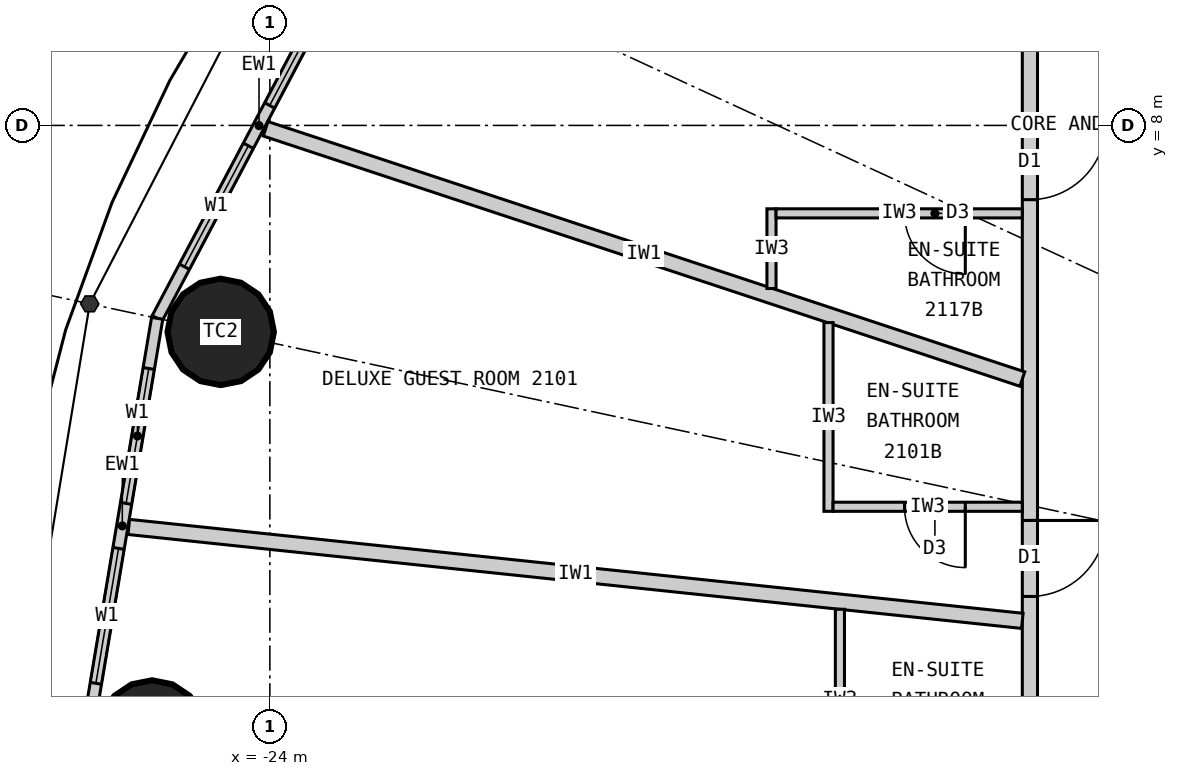
"""IFC4 building model, lengths in metres.
Left out: names, types, materials, properties, quantities, classifications, styles, units other than length and angle.
Written with IfcOpenShell. Run it as: python <this file> out.ifc"""

import sys

from ifc_helpers import new_model, si_unit, direction, frame, frame_2d, origin, origin_2d, place, context, subcontext, project, spatial, rectangle, circle, extrude, element, fill, save


model = new_model("IFC4")
c1 = context("Model", 3, precision=1e-05, world=origin(), true_north=direction((0.0, 1.0)))
c2 = subcontext(c1, "Body", "Model", "MODEL_VIEW")
j1 = project(units=[si_unit("LENGTHUNIT", "METRE"), si_unit("PLANEANGLEUNIT", "RADIAN")], contexts=[c1])
p1 = place(None, origin())
s1 = spatial("IfcSite", under=j1, at=p1, CompositionType="ELEMENT")
p2 = place(p1, origin())
s2 = spatial("IfcBuilding", under=s1, at=p2, CompositionType="ELEMENT")
p3 = place(p2, frame((0.0, 0.0, 83.7)))
s3 = spatial("IfcBuildingStorey", under=s2, at=p3, CompositionType="ELEMENT", Elevation=83.7)
for number, where, z_axis, x_axis in (
    (1, (-24.647, 5.283, 0.0), (0.0, 0.0, 1.0), (1.0, 0.0, 0.0)),
    (2, (-25.55, 0.0, 0.0), (0.0, 0.0, 1.0), (1.0, 0.0, 0.0)),
):
    element("IfcColumn", number, at=place(p3, frame(where, z_axis=z_axis, x_axis=x_axis)), inside=s3, PredefinedType="COLUMN", context=c2, shape_type="SweptSolid", body=[
        extrude(circle(Radius=0.7, at=origin_2d()), origin(), (0.0, 0.0, 1.0), 3.3),
    ])
p4 = place(p3, frame((-22.803, 10.532, 0.0), z_axis=(0.0, 0.0, 1.0), x_axis=(-0.467296867008, -0.884100468321, 0.0)))
e3 = element("IfcWall", 3, at=p4, inside=s3, PredefinedType="ELEMENTEDWALL", context=c2, shape_type="SweptSolid", body=[
    extrude(rectangle(XDim=5.734, YDim=0.15, at=frame_2d((2.867, 0.0))), origin(), (0.0, 0.0, 1.0), 3.12),
])
p5 = place(p4, frame((0.767, 0.0, 0.9)))
e4 = element("IfcOpeningElement", 4, at=p5, cuts=e3, PredefinedType="OPENING", context=c2, shape_type="SweptSolid", body=[
    extrude(rectangle(XDim=1.8, YDim=1.9, at=frame_2d((0.9, 0.95))), frame((0.0, 0.085, 0.0), z_axis=(0.0, -1.0, 0.0), x_axis=(1.0, 0.0, 0.0)), (0.0, 0.0, 1.0), 0.17),
])
p6 = place(p4, frame((3.167, 0.0, 0.9)))
e5 = element("IfcOpeningElement", 5, at=p6, cuts=e3, PredefinedType="OPENING", context=c2, shape_type="SweptSolid", body=[
    extrude(rectangle(XDim=1.8, YDim=1.9, at=frame_2d((0.9, 0.95))), frame((0.0, 0.085, 0.0), z_axis=(0.0, -1.0, 0.0), x_axis=(1.0, 0.0, 0.0)), (0.0, 0.0, 1.0), 0.17),
])
p7 = place(p3, frame((-25.482, 5.462, 0.0), z_axis=(0.0, 0.0, 1.0), x_axis=(-0.165642551694, -0.986185857264, 0.0)))
e6 = element("IfcWall", 6, at=p7, inside=s3, PredefinedType="ELEMENTEDWALL", context=c2, shape_type="SweptSolid", body=[
    extrude(rectangle(XDim=5.539, YDim=0.15, at=frame_2d((2.77, 0.0))), origin(), (0.0, 0.0, 1.0), 3.12),
])
p8 = place(p7, frame((0.669, 0.0, 0.9)))
e7 = element("IfcOpeningElement", 7, at=p8, cuts=e6, PredefinedType="OPENING", context=c2, shape_type="SweptSolid", body=[
    extrude(rectangle(XDim=1.8, YDim=1.9, at=frame_2d((0.9, 0.95))), frame((0.0, 0.085, 0.0), z_axis=(0.0, -1.0, 0.0), x_axis=(1.0, 0.0, 0.0)), (0.0, 0.0, 1.0), 0.17),
])
p9 = place(p7, frame((3.07, 0.0, 0.9)))
e8 = element("IfcOpeningElement", 8, at=p9, cuts=e6, PredefinedType="OPENING", context=c2, shape_type="SweptSolid", body=[
    extrude(rectangle(XDim=1.8, YDim=1.9, at=frame_2d((0.9, 0.95))), frame((0.0, 0.085, 0.0), z_axis=(0.0, -1.0, 0.0), x_axis=(1.0, 0.0, 0.0)), (0.0, 0.0, 1.0), 0.17),
])
p10 = place(p3, frame((-14.0, 9.9, 0.0), z_axis=(0.0, 0.0, 1.0), x_axis=(0.0, -1.0, 0.0)))
e9 = element("IfcWall", 9, at=p10, inside=s3, PredefinedType="PARTITIONING", context=c2, shape_type="SweptSolid", body=[
    extrude(rectangle(XDim=19.8, YDim=0.2, at=frame_2d((9.9, 0.0))), origin(), (0.0, 0.0, 1.0), 3.12),
])
p11 = place(p10, frame((7.097, 0.0, 0.0)))
e10 = element("IfcOpeningElement", 10, at=p11, cuts=e9, PredefinedType="OPENING", context=c2, shape_type="SweptSolid", body=[
    extrude(rectangle(XDim=1.0, YDim=2.2, at=frame_2d((0.5, 1.1))), frame((0.0, 0.11, 0.0), z_axis=(0.0, -1.0, 0.0), x_axis=(1.0, 0.0, 0.0)), (0.0, 0.0, 1.0), 0.22),
])
p12 = place(p10, frame((10.778, 0.0, 0.0)))
e11 = element("IfcOpeningElement", 11, at=p12, cuts=e9, PredefinedType="OPENING", context=c2, shape_type="SweptSolid", body=[
    extrude(rectangle(XDim=1.0, YDim=2.2, at=frame_2d((0.5, 1.1))), frame((0.0, 0.11, 0.0), z_axis=(0.0, -1.0, 0.0), x_axis=(1.0, 0.0, 0.0)), (0.0, 0.0, 1.0), 0.22),
])
p13 = place(p10, frame((13.552, 0.0, 0.0)))
e12 = element("IfcOpeningElement", 12, at=p13, cuts=e9, PredefinedType="OPENING", context=c2, shape_type="SweptSolid", body=[
    extrude(rectangle(XDim=1.0, YDim=2.2, at=frame_2d((0.5, 1.1))), frame((0.0, 0.11, 0.0), z_axis=(0.0, -1.0, 0.0), x_axis=(1.0, 0.0, 0.0)), (0.0, 0.0, 1.0), 0.22),
])
p14 = place(p10, frame((18.698, 0.0, 0.0)))
e13 = element("IfcOpeningElement", 13, at=p14, cuts=e9, PredefinedType="OPENING", context=c2, shape_type="SweptSolid", body=[
    extrude(rectangle(XDim=1.0, YDim=2.2, at=frame_2d((0.5, 1.1))), frame((0.0, 0.11, 0.0), z_axis=(0.0, -1.0, 0.0), x_axis=(1.0, 0.0, 0.0)), (0.0, 0.0, 1.0), 0.22),
])
p15 = place(p10, frame((1.877, 0.0, 0.0)))
e14 = element("IfcOpeningElement", 14, at=p15, cuts=e9, PredefinedType="OPENING", context=c2, shape_type="SweptSolid", body=[
    extrude(rectangle(XDim=1.0, YDim=2.2, at=frame_2d((0.5, 1.1))), frame((0.0, 0.11, 0.0), z_axis=(0.0, -1.0, 0.0), x_axis=(1.0, 0.0, 0.0)), (0.0, 0.0, 1.0), 0.22),
])
p16 = place(p3, frame((-14.1, 4.663, 0.0), z_axis=(0.0, 0.0, 1.0), x_axis=(-0.949432655039, 0.31397075269, 0.0)))
e15 = element("IfcWall", 15, at=p16, inside=s3, PredefinedType="PARTITIONING", context=c2, shape_type="SweptSolid", body=[
    extrude(rectangle(XDim=10.486, YDim=0.2, at=frame_2d((5.243, 0.0))), origin(), (0.0, 0.0, 1.0), 3.12),
])
p17 = place(p3, frame((-14.1, 1.482, 0.0), z_axis=(0.0, 0.0, 1.0), x_axis=(-0.994522076235, 0.104526742422, 0.0)))
e16 = element("IfcWall", 16, at=p17, inside=s3, PredefinedType="PARTITIONING", context=c2, shape_type="SweptSolid", body=[
    extrude(rectangle(XDim=11.821, YDim=0.2, at=frame_2d((5.91, 0.0))), origin(), (0.0, 0.0, 1.0), 2.32),
])
p18 = place(p3, frame((-16.65, 5.406, 0.0), z_axis=(0.0, 0.0, 1.0), x_axis=(0.0, -1.0, 0.0)))
e17 = element("IfcWall", 17, at=p18, inside=s3, PredefinedType="PARTITIONING", context=c2, shape_type="SweptSolid", body=[
    extrude(rectangle(XDim=2.483, YDim=0.12, at=frame_2d((1.242, 0.0))), origin(), (0.0, 0.0, 1.0), 3.12),
])
p19 = place(p3, frame((-14.1, 2.983, 0.0), z_axis=(0.0, 0.0, 1.0), x_axis=(-1.0, 0.0, 0.0)))
e18 = element("IfcWall", 18, at=p19, inside=s3, PredefinedType="PARTITIONING", context=c2, shape_type="SweptSolid", body=[
    extrude(rectangle(XDim=2.49, YDim=0.12, at=frame_2d((1.245, 0.0))), origin(), (0.0, 0.0, 1.0), 3.12),
])
p20 = place(p19, frame((0.75, 0.0, 0.0)))
e19 = element("IfcOpeningElement", 19, at=p20, cuts=e18, PredefinedType="OPENING", context=c2, shape_type="SweptSolid", body=[
    extrude(rectangle(XDim=0.8, YDim=2.1, at=frame_2d((0.4, 1.05))), frame((0.0, 0.07, 0.0), z_axis=(0.0, -1.0, 0.0), x_axis=(1.0, 0.0, 0.0)), (0.0, 0.0, 1.0), 0.14),
])
p21 = place(p3, frame((-16.5, 1.634, 0.0), z_axis=(0.0, 0.0, 1.0), x_axis=(0.0, -1.0, 0.0)))
e20 = element("IfcWall", 20, at=p21, inside=s3, PredefinedType="PARTITIONING", context=c2, shape_type="SweptSolid", body=[
    extrude(rectangle(XDim=2.392, YDim=0.12, at=frame_2d((1.196, 0.0))), origin(), (0.0, 0.0, 1.0), 3.12),
])
p22 = place(p3, frame((-17.4, 5.854, 0.0), z_axis=(0.0, 0.0, 1.0), x_axis=(0.0, 1.0, 0.0)))
e21 = element("IfcWall", 21, at=p22, inside=s3, PredefinedType="PARTITIONING", context=c2, shape_type="SweptSolid", body=[
    extrude(rectangle(XDim=1.049, YDim=0.12, at=frame_2d((0.524, 0.0))), origin(), (0.0, 0.0, 1.0), 3.12),
])
p23 = place(p3, frame((-14.1, 6.843, 0.0), z_axis=(0.0, 0.0, 1.0), x_axis=(-1.0, 0.0, 0.0)))
e22 = element("IfcWall", 22, at=p23, inside=s3, PredefinedType="PARTITIONING", context=c2, shape_type="SweptSolid", body=[
    extrude(rectangle(XDim=3.24, YDim=0.12, at=frame_2d((1.62, 0.0))), origin(), (0.0, 0.0, 1.0), 3.12),
])
p24 = place(p23, frame((0.75, 0.0, 0.0)))
e23 = element("IfcOpeningElement", 23, at=p24, cuts=e22, PredefinedType="OPENING", context=c2, shape_type="SweptSolid", body=[
    extrude(rectangle(XDim=0.8, YDim=2.1, at=frame_2d((0.4, 1.05))), frame((0.0, 0.07, 0.0), z_axis=(0.0, -1.0, 0.0), x_axis=(1.0, 0.0, 0.0)), (0.0, 0.0, 1.0), 0.14),
])
p25 = place(p5, origin())
e24 = element("IfcWindow", 24, at=p25, inside=s3, PartitioningType="SINGLE_PANEL", PredefinedType="WINDOW", context=c2, shape_type="SweptSolid", body=[
    extrude(rectangle(XDim=1.8, YDim=1.9, at=frame_2d((0.9, 0.95))), frame((0.0, 0.03, 0.0), z_axis=(0.0, -1.0, 0.0), x_axis=(1.0, 0.0, 0.0)), (0.0, 0.0, 1.0), 0.06),
])
fill(e4, e24)
p26 = place(p6, origin())
e25 = element("IfcWindow", 25, at=p26, inside=s3, PartitioningType="SINGLE_PANEL", PredefinedType="WINDOW", context=c2, shape_type="SweptSolid", body=[
    extrude(rectangle(XDim=1.8, YDim=1.9, at=frame_2d((0.9, 0.95))), frame((0.0, 0.03, 0.0), z_axis=(0.0, -1.0, 0.0), x_axis=(1.0, 0.0, 0.0)), (0.0, 0.0, 1.0), 0.06),
])
fill(e5, e25)
p27 = place(p8, origin())
e26 = element("IfcWindow", 26, at=p27, inside=s3, PartitioningType="SINGLE_PANEL", PredefinedType="WINDOW", context=c2, shape_type="SweptSolid", body=[
    extrude(rectangle(XDim=1.8, YDim=1.9, at=frame_2d((0.9, 0.95))), frame((0.0, 0.03, 0.0), z_axis=(0.0, -1.0, 0.0), x_axis=(1.0, 0.0, 0.0)), (0.0, 0.0, 1.0), 0.06),
])
fill(e7, e26)
p28 = place(p9, origin())
e27 = element("IfcWindow", 27, at=p28, inside=s3, PartitioningType="SINGLE_PANEL", PredefinedType="WINDOW", context=c2, shape_type="SweptSolid", body=[
    extrude(rectangle(XDim=1.8, YDim=1.9, at=frame_2d((0.9, 0.95))), frame((0.0, 0.03, 0.0), z_axis=(0.0, -1.0, 0.0), x_axis=(1.0, 0.0, 0.0)), (0.0, 0.0, 1.0), 0.06),
])
fill(e8, e27)
p29 = place(p20, origin())
e28 = element("IfcDoor", 28, at=p29, inside=s3, OperationType="SINGLE_SWING_LEFT", PredefinedType="DOOR", context=c2, shape_type="SweptSolid", body=[
    extrude(rectangle(XDim=0.8, YDim=2.1, at=frame_2d((0.4, 1.05))), frame((0.0, 0.025, 0.0), z_axis=(0.0, -1.0, 0.0), x_axis=(1.0, 0.0, 0.0)), (0.0, 0.0, 1.0), 0.05),
])
fill(e19, e28)
p30 = place(p11, origin())
e29 = element("IfcDoor", 29, at=p30, inside=s3, OperationType="SINGLE_SWING_LEFT", PredefinedType="DOOR", context=c2, shape_type="SweptSolid", body=[
    extrude(rectangle(XDim=1.0, YDim=2.2, at=frame_2d((0.5, 1.1))), frame((0.0, 0.025, 0.0), z_axis=(0.0, -1.0, 0.0), x_axis=(1.0, 0.0, 0.0)), (0.0, 0.0, 1.0), 0.05),
])
fill(e10, e29)
p31 = place(p24, origin())
e30 = element("IfcDoor", 30, at=p31, inside=s3, OperationType="SINGLE_SWING_LEFT", PredefinedType="DOOR", context=c2, shape_type="SweptSolid", body=[
    extrude(rectangle(XDim=0.8, YDim=2.1, at=frame_2d((0.4, 1.05))), frame((0.0, 0.025, 0.0), z_axis=(0.0, -1.0, 0.0), x_axis=(1.0, 0.0, 0.0)), (0.0, 0.0, 1.0), 0.05),
])
fill(e23, e30)
p32 = place(p15, origin())
e31 = element("IfcDoor", 31, at=p32, inside=s3, OperationType="SINGLE_SWING_LEFT", PredefinedType="DOOR", context=c2, shape_type="SweptSolid", body=[
    extrude(rectangle(XDim=1.0, YDim=2.2, at=frame_2d((0.5, 1.1))), frame((0.0, 0.025, 0.0), z_axis=(0.0, -1.0, 0.0), x_axis=(1.0, 0.0, 0.0)), (0.0, 0.0, 1.0), 0.05),
])
fill(e14, e31)
save(model, sys.argv[1])
